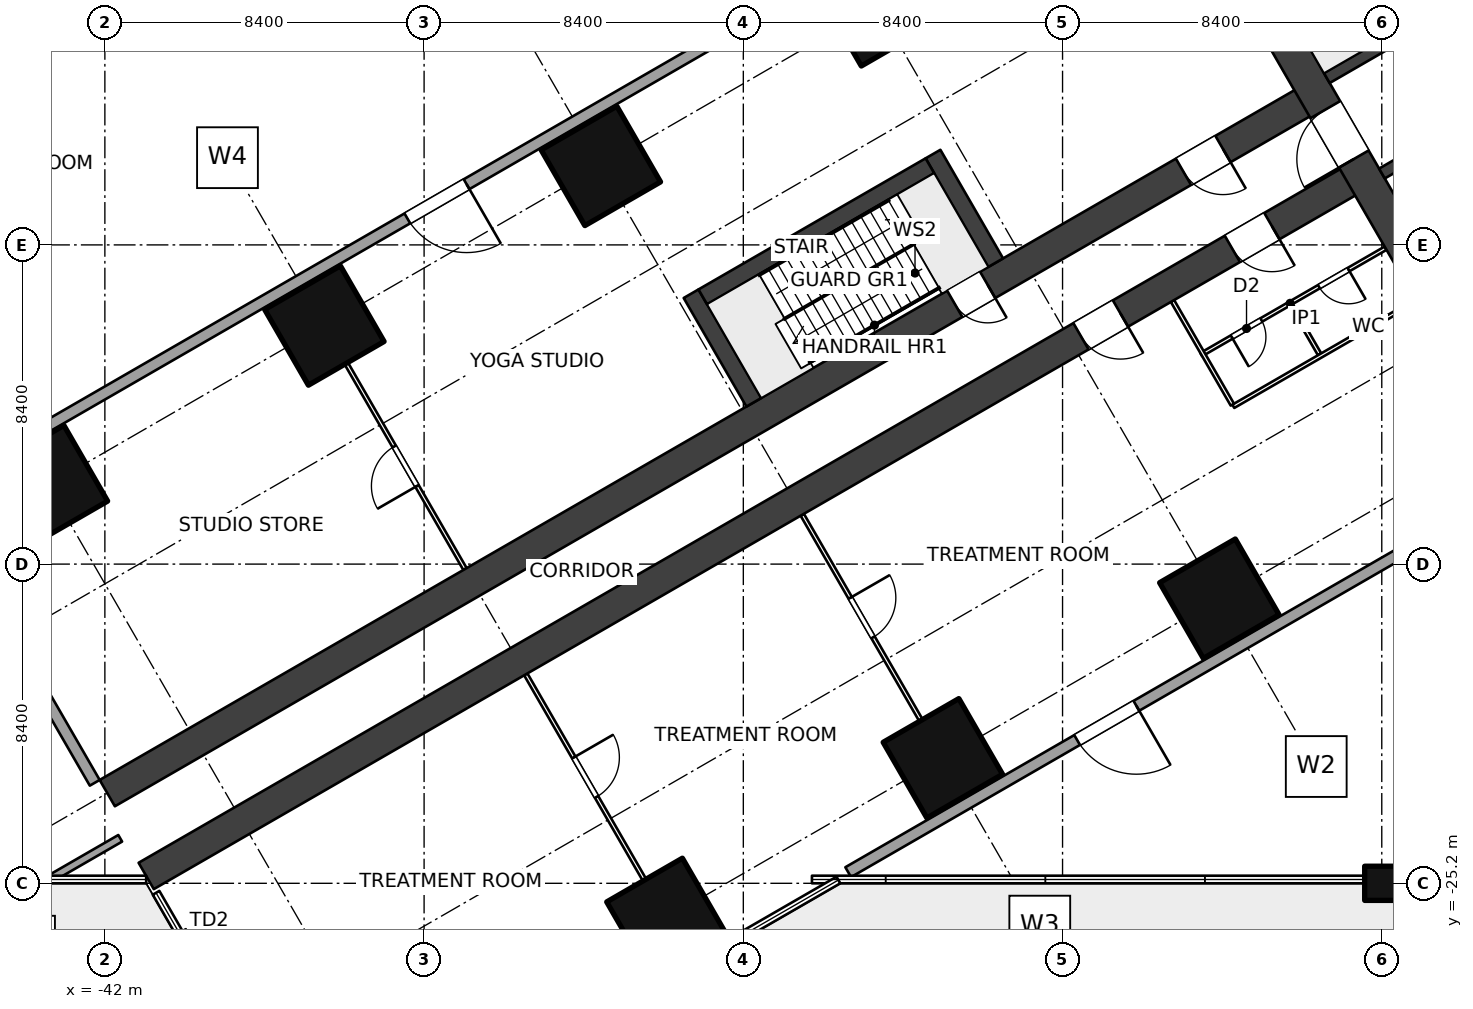
"""IFC4 building model, lengths in metres.
Left out: names, types, materials, properties, quantities, classifications, styles, units other than length and angle.
Written with IfcOpenShell. Run it as: python <this file> out.ifc"""

import sys

from ifc_helpers import new_model, si_unit, direction, frame, frame_2d, origin, origin_2d, place, context, subcontext, project, spatial, rectangle, extrude, element, fill, save


model = new_model("IFC4")
c1 = context("Model", 3, precision=1e-05, world=origin(), true_north=direction((0.0, 1.0)))
c2 = subcontext(c1, "Body", "Model", "MODEL_VIEW")
j1 = project(units=[si_unit("LENGTHUNIT", "METRE"), si_unit("PLANEANGLEUNIT", "RADIAN")], contexts=[c1])
p1 = place(None, origin())
s1 = spatial("IfcSite", under=j1, at=p1, CompositionType="ELEMENT")
p2 = place(p1, origin())
s2 = spatial("IfcBuilding", under=s1, at=p2, CompositionType="ELEMENT")
p3 = place(p2, frame((0.0, 0.0, 11.0)))
s3 = spatial("IfcBuildingStorey", under=s2, at=p3, CompositionType="ELEMENT", Elevation=11.0)
for number, where, z_axis, x_axis in (
    (1, (-12.675, -17.71, 0.0), (0.0, 0.0, 1.0), (-0.5, 0.866, 0.0)),
    (2, (-21.675, -2.122, 0.0), (0.0, 0.0, 1.0), (-0.5, 0.866, 0.0)),
    (3, (-19.949, -21.91, 0.0), (0.0, 0.0, 1.0), (-0.5, 0.866, 0.0)),
    (4, (-28.949, -6.322, 0.0), (0.0, 0.0, 1.0), (-0.5, 0.866, 0.0)),
    (5, (-27.224, -26.11, 0.0), (0.0, 0.0, 1.0), (-0.5, 0.866, 0.0)),
    (6, (-36.224, -10.521, 0.0), (0.0, 0.0, 1.0), (-0.5, 0.866, 0.0)),
    (7, (-43.499, -14.721, 0.0), (0.0, 0.0, 1.0), (-0.5, 0.866, 0.0)),
):
    element("IfcColumn", number, at=place(p3, frame(where, z_axis=z_axis, x_axis=x_axis)), inside=s3, PredefinedType="COLUMN", context=c2, shape_type="SweptSolid", body=[
        extrude(rectangle(XDim=2.3, YDim=2.3, at=origin_2d()), origin(), (0.0, 0.0, 1.0), 5.0),
    ])
p4 = place(p3, frame((-8.4, -25.2, 0.0), z_axis=(0.0, 0.0, 1.0), x_axis=(1.0, 0.0, 0.0)))
e8 = element("IfcColumn", 8, at=p4, inside=s3, PredefinedType="COLUMN", context=c2, shape_type="SweptSolid", body=[
    extrude(rectangle(XDim=0.9, YDim=0.9, at=origin_2d()), origin(), (0.0, 0.0, 1.0), 5.0),
])
p5 = place(p3, frame((-6.47, -10.757, 0.0), z_axis=(0.0, 0.0, 1.0), x_axis=(-0.499997612506, 0.8660267822, 0.0)))
e9 = element("IfcWall", 9, at=p5, inside=s3, PredefinedType="SHEAR", context=c2, shape_type="SweptSolid", body=[
    extrude(rectangle(XDim=12.161, YDim=0.9, at=frame_2d((6.08, 0.0))), origin(), (0.0, 0.0, 1.0), 5.0),
])
p6 = place(p5, frame((5.33, 0.0, 0.0)))
e10 = element("IfcOpeningElement", 10, at=p6, cuts=e9, PredefinedType="OPENING", context=c2, shape_type="SweptSolid", body=[
    extrude(rectangle(XDim=1.5, YDim=2.1, at=frame_2d((0.75, 1.05))), frame((0.0, 0.46, 0.0), z_axis=(0.0, -1.0, 0.0), x_axis=(1.0, 0.0, 0.0)), (0.0, 0.0, 1.0), 0.92),
])
p7 = place(p3, frame((-3.869, -0.559, 0.0), z_axis=(0.0, 0.0, 1.0), x_axis=(-0.86602711848, -0.499997030048, 0.0)))
e11 = element("IfcWall", 11, at=p7, inside=s3, PredefinedType="SHEAR", context=c2, shape_type="SweptSolid", body=[
    extrude(rectangle(XDim=6.901, YDim=0.3, at=frame_2d((3.451, 0.0))), origin(), (0.0, 0.0, 1.0), 5.0),
])
p8 = place(p7, frame((0.25, 0.0, 0.0)))
e12 = element("IfcOpeningElement", 12, at=p8, cuts=e11, PredefinedType="OPENING", context=c2, shape_type="SweptSolid", body=[
    extrude(rectangle(XDim=1.0, YDim=2.1, at=frame_2d((0.5, 1.05))), frame((0.0, 0.16, 0.0), z_axis=(0.0, -1.0, 0.0), x_axis=(1.0, 0.0, 0.0)), (0.0, 0.0, 1.0), 0.32),
])
p9 = place(p3, frame((-2.419, -3.071, 0.0), z_axis=(0.0, 0.0, 1.0), x_axis=(-0.86602711848, -0.499997030048, 0.0)))
e13 = element("IfcWall", 13, at=p9, inside=s3, PredefinedType="SHEAR", context=c2, shape_type="SweptSolid", body=[
    extrude(rectangle(XDim=6.901, YDim=0.3, at=frame_2d((3.451, 0.0))), origin(), (0.0, 0.0, 1.0), 5.0),
])
p10 = place(p9, frame((4.85, 0.0, 0.0)))
e14 = element("IfcOpeningElement", 14, at=p10, cuts=e13, PredefinedType="OPENING", context=c2, shape_type="SweptSolid", body=[
    extrude(rectangle(XDim=1.1, YDim=2.1, at=frame_2d((0.55, 1.05))), frame((0.0, 0.16, 0.0), z_axis=(0.0, -1.0, 0.0), x_axis=(1.0, 0.0, 0.0)), (0.0, 0.0, 1.0), 0.32),
])
p11 = place(p3, frame((-8.91, -6.53, 0.0), z_axis=(0.0, 0.0, 1.0), x_axis=(-0.866024404313, -0.500001731131, 0.0)))
e15 = element("IfcWall", 15, at=p11, inside=s3, PredefinedType="SHEAR", context=c2, shape_type="SweptSolid", body=[
    extrude(rectangle(XDim=36.953, YDim=0.8, at=frame_2d((18.477, 0.0))), origin(), (0.0, 0.0, 1.0), 5.0),
])
p12 = place(p11, frame((2.75, 0.0, 0.0)))
e16 = element("IfcOpeningElement", 16, at=p12, cuts=e15, PredefinedType="OPENING", context=c2, shape_type="SweptSolid", body=[
    extrude(rectangle(XDim=1.2, YDim=2.1, at=frame_2d((0.6, 1.05))), frame((0.0, 0.41, 0.0), z_axis=(0.0, -1.0, 0.0), x_axis=(1.0, 0.0, 0.0)), (0.0, 0.0, 1.0), 0.82),
])
p13 = place(p11, frame((7.35, 0.0, 0.0)))
e17 = element("IfcOpeningElement", 17, at=p13, cuts=e15, PredefinedType="OPENING", context=c2, shape_type="SweptSolid", body=[
    extrude(rectangle(XDim=1.2, YDim=2.1, at=frame_2d((0.6, 1.05))), frame((0.0, 0.41, 0.0), z_axis=(0.0, -1.0, 0.0), x_axis=(1.0, 0.0, 0.0)), (0.0, 0.0, 1.0), 0.82),
])
p14 = place(p3, frame((-10.11, -4.451, 0.0), z_axis=(0.0, 0.0, 1.0), x_axis=(-0.866025284237, -0.500000207062, 0.0)))
e18 = element("IfcWall", 18, at=p14, inside=s3, PredefinedType="SHEAR", context=c2, shape_type="SweptSolid", body=[
    extrude(rectangle(XDim=36.75, YDim=0.8, at=frame_2d((18.375, 0.0))), origin(), (0.0, 0.0, 1.0), 5.0),
])
p15 = place(p14, frame((10.0, 0.0, 0.0)))
e19 = element("IfcOpeningElement", 19, at=p15, cuts=e18, PredefinedType="OPENING", context=c2, shape_type="SweptSolid", body=[
    extrude(rectangle(XDim=1.0, YDim=2.1, at=frame_2d((0.5, 1.05))), frame((0.0, 0.41, 0.0), z_axis=(0.0, -1.0, 0.0), x_axis=(1.0, 0.0, 0.0)), (0.0, 0.0, 1.0), 0.82),
])
p16 = place(p14, frame((2.85, 0.0, 0.0)))
e20 = element("IfcOpeningElement", 20, at=p16, cuts=e18, PredefinedType="OPENING", context=c2, shape_type="SweptSolid", body=[
    extrude(rectangle(XDim=1.2, YDim=2.1, at=frame_2d((0.6, 1.05))), frame((0.0, 0.41, 0.0), z_axis=(0.0, -1.0, 0.0), x_axis=(1.0, 0.0, 0.0)), (0.0, 0.0, 1.0), 0.82),
])
p17 = place(p3, frame((-8.3, -8.487, 0.0), z_axis=(0.0, 0.0, 1.0), x_axis=(-0.866015695474, -0.500016814911, 0.0)))
e21 = element("IfcWall", 21, at=p17, inside=s3, PredefinedType="PARTITIONING", context=c2, shape_type="SweptSolid", body=[
    extrude(rectangle(XDim=5.6, YDim=0.1, at=frame_2d((2.8, 0.0))), origin(), (0.0, 0.0, 1.0), 4.7),
])
p18 = place(p17, frame((1.125, 0.0, 0.0)))
e22 = element("IfcOpeningElement", 22, at=p18, cuts=e21, PredefinedType="OPENING", context=c2, shape_type="SweptSolid", body=[
    extrude(rectangle(XDim=0.9, YDim=2.1, at=frame_2d((0.45, 1.05))), frame((0.0, 0.06, 0.0), z_axis=(0.0, -1.0, 0.0), x_axis=(1.0, 0.0, 0.0)), (0.0, 0.0, 1.0), 0.12),
])
p19 = place(p17, frame((3.775, 0.0, 0.0)))
e23 = element("IfcOpeningElement", 23, at=p19, cuts=e21, PredefinedType="OPENING", context=c2, shape_type="SweptSolid", body=[
    extrude(rectangle(XDim=0.9, YDim=2.1, at=frame_2d((0.45, 1.05))), frame((0.0, 0.06, 0.0), z_axis=(0.0, -1.0, 0.0), x_axis=(1.0, 0.0, 0.0)), (0.0, 0.0, 1.0), 0.12),
])
p20 = place(p3, frame((-10.786, -9.98, 0.0), z_axis=(0.0, 0.0, 1.0), x_axis=(0.500060622324, -0.86599040064, 0.0)))
e24 = element("IfcWall", 24, at=p20, inside=s3, PredefinedType="PARTITIONING", context=c2, shape_type="SweptSolid", body=[
    extrude(rectangle(XDim=1.5, YDim=0.1, at=frame_2d((0.75, 0.0))), origin(), (0.0, 0.0, 1.0), 4.7),
])
p21 = place(p3, frame((-7.5, -9.873, 0.0), z_axis=(0.0, 0.0, 1.0), x_axis=(-0.866031018186, -0.499990275446, 0.0)))
e25 = element("IfcWall", 25, at=p21, inside=s3, PredefinedType="PARTITIONING", context=c2, shape_type="SweptSolid", body=[
    extrude(rectangle(XDim=5.55, YDim=0.1, at=frame_2d((2.775, 0.0))), origin(), (0.0, 0.0, 1.0), 4.7),
])
p22 = place(p3, frame((-13.906, -9.876, 0.0), z_axis=(0.0, 0.0, 1.0), x_axis=(0.499981869177, -0.866035871367, 0.0)))
e26 = element("IfcWall", 26, at=p22, inside=s3, PredefinedType="PARTITIONING", context=c2, shape_type="SweptSolid", body=[
    extrude(rectangle(XDim=3.15, YDim=0.1, at=frame_2d((1.575, 0.0))), origin(), (0.0, 0.0, 1.0), 4.7),
])
p23 = place(p3, frame((-23.649, -15.501, 0.0), z_axis=(0.0, 0.0, 1.0), x_axis=(0.500004234368, -0.866022959057, 0.0)))
e27 = element("IfcWall", 27, at=p23, inside=s3, PredefinedType="PARTITIONING", context=c2, shape_type="SweptSolid", body=[
    extrude(rectangle(XDim=6.25, YDim=0.1, at=frame_2d((3.125, 0.0))), origin(), (0.0, 0.0, 1.0), 2.9),
])
p24 = place(p23, frame((2.525, 0.0, 0.0)))
e28 = element("IfcOpeningElement", 28, at=p24, cuts=e27, PredefinedType="OPENING", context=c2, shape_type="SweptSolid", body=[
    extrude(rectangle(XDim=1.2, YDim=2.1, at=frame_2d((0.6, 1.05))), frame((0.0, 0.06, 0.0), z_axis=(0.0, -1.0, 0.0), x_axis=(1.0, 0.0, 0.0)), (0.0, 0.0, 1.0), 0.12),
])
p25 = place(p3, frame((-30.924, -19.701, 0.0), z_axis=(0.0, 0.0, 1.0), x_axis=(0.500004234368, -0.866022959057, 0.0)))
e29 = element("IfcWall", 29, at=p25, inside=s3, PredefinedType="PARTITIONING", context=c2, shape_type="SweptSolid", body=[
    extrude(rectangle(XDim=6.25, YDim=0.1, at=frame_2d((3.125, 0.0))), origin(), (0.0, 0.0, 1.0), 2.9),
])
p26 = place(p25, frame((2.525, 0.0, 0.0)))
e30 = element("IfcOpeningElement", 30, at=p26, cuts=e29, PredefinedType="OPENING", context=c2, shape_type="SweptSolid", body=[
    extrude(rectangle(XDim=1.2, YDim=2.1, at=frame_2d((0.6, 1.05))), frame((0.0, 0.06, 0.0), z_axis=(0.0, -1.0, 0.0), x_axis=(1.0, 0.0, 0.0)), (0.0, 0.0, 1.0), 0.12),
])
p27 = place(p3, frame((-32.524, -16.93, 0.0), z_axis=(0.0, 0.0, 1.0), x_axis=(-0.500004234368, 0.866022959057, 0.0)))
e31 = element("IfcWall", 31, at=p27, inside=s3, PredefinedType="PARTITIONING", context=c2, shape_type="SweptSolid", body=[
    extrude(rectangle(XDim=6.25, YDim=0.1, at=frame_2d((3.125, 0.0))), origin(), (0.0, 0.0, 1.0), 2.9),
])
p28 = place(p27, frame((2.525, 0.0, 0.0)))
e32 = element("IfcOpeningElement", 32, at=p28, cuts=e31, PredefinedType="OPENING", context=c2, shape_type="SweptSolid", body=[
    extrude(rectangle(XDim=1.2, YDim=2.1, at=frame_2d((0.6, 1.05))), frame((0.0, 0.06, 0.0), z_axis=(0.0, -1.0, 0.0), x_axis=(1.0, 0.0, 0.0)), (0.0, 0.0, 1.0), 0.12),
])
p29 = place(p3, frame((-41.596, -24.016, 0.0), z_axis=(0.0, 0.0, 1.0), x_axis=(-0.866065436262, -0.499930655304, 0.0)))
e33 = element("IfcWall", 33, at=p29, inside=s3, PredefinedType="SOLIDWALL", context=c2, shape_type="SweptSolid", body=[
    extrude(rectangle(XDim=2.368, YDim=0.2, at=frame_2d((1.184, 0.0))), origin(), (0.0, 0.0, 1.0), 4.7),
])
p30 = place(p3, frame((-42.267, -22.555, 0.0), z_axis=(0.0, 0.0, 1.0), x_axis=(-0.500007509209, 0.866021068297, 0.0)))
e34 = element("IfcWall", 34, at=p30, inside=s3, PredefinedType="SOLIDWALL", context=c2, shape_type="SweptSolid", body=[
    extrude(rectangle(XDim=8.6, YDim=0.3, at=frame_2d((4.3, 0.0))), origin(), (0.0, 0.0, 1.0), 3.1),
])
p31 = place(p3, frame((-0.15, -12.038, 0.0), z_axis=(0.0, 0.0, 1.0), x_axis=(-0.866030473254, -0.499991219318, 0.0)))
e35 = element("IfcWall", 35, at=p31, inside=s3, PredefinedType="SOLIDWALL", context=c2, shape_type="SweptSolid", body=[
    extrude(rectangle(XDim=25.739, YDim=0.3, at=frame_2d((12.869, 0.0))), origin(), (0.0, 0.0, 1.0), 4.7),
])
p32 = place(p31, frame((16.983, 0.0, 0.0)))
e36 = element("IfcOpeningElement", 36, at=p32, cuts=e35, PredefinedType="OPENING", context=c2, shape_type="SweptSolid", body=[
    extrude(rectangle(XDim=1.8, YDim=2.4, at=frame_2d((0.9, 1.2))), frame((0.0, 0.16, 0.0), z_axis=(0.0, -1.0, 0.0), x_axis=(1.0, 0.0, 0.0)), (0.0, 0.0, 1.0), 0.32),
])
p33 = place(p3, frame((-9.45, 6.495, 0.0), z_axis=(0.0, 0.0, 1.0), x_axis=(-0.866025301493, -0.500000177174, 0.0)))
e37 = element("IfcWall", 37, at=p33, inside=s3, PredefinedType="SOLIDWALL", context=c2, shape_type="SweptSolid", body=[
    extrude(rectangle(XDim=43.095, YDim=0.3, at=frame_2d((21.548, 0.0))), origin(), (0.0, 0.0, 1.0), 4.7),
])
p34 = place(p33, frame((26.595, 0.0, 0.0)))
e38 = element("IfcOpeningElement", 38, at=p34, cuts=e37, PredefinedType="OPENING", context=c2, shape_type="SweptSolid", body=[
    extrude(rectangle(XDim=1.8, YDim=2.4, at=frame_2d((0.9, 1.2))), frame((0.0, 0.16, 0.0), z_axis=(0.0, -1.0, 0.0), x_axis=(1.0, 0.0, 0.0)), (0.0, 0.0, 1.0), 0.32),
])
for number, where, z_axis, x_axis in (
    (39, (-18.559, -8.868, 0.0), (0.0, 0.0, 1.0), (-0.5, 0.866, 0.0)),
    (40, (-24.925, -12.543, 0.0), (0.0, 0.0, 1.0), (-0.5, 0.866, 0.0)),
):
    element("IfcWall", number, at=place(p3, frame(where, z_axis=z_axis, x_axis=x_axis)), inside=s3, PredefinedType="SOLIDWALL", context=c2, shape_type="SweptSolid", body=[
        extrude(rectangle(XDim=3.3, YDim=0.45, at=frame_2d((1.65, 0.0))), origin(), (0.0, 0.0, 1.0), 5.0),
    ])
p35 = place(p3, frame((-20.292, -6.317, 0.0), z_axis=(0.0, 0.0, 1.0), x_axis=(-0.866028853923, -0.499994024137, 0.0)))
e41 = element("IfcWall", 41, at=p35, inside=s3, PredefinedType="SOLIDWALL", context=c2, shape_type="SweptSolid", body=[
    extrude(rectangle(XDim=6.9, YDim=0.45, at=frame_2d((3.45, 0.0))), origin(), (0.0, 0.0, 1.0), 5.0),
])
p36 = place(p6, origin())
e42 = element("IfcDoor", 42, at=p36, inside=s3, OperationType="DOUBLE_DOOR_DOUBLE_SWING", PredefinedType="DOOR", context=c2, shape_type="SweptSolid", body=[
    extrude(rectangle(XDim=1.5, YDim=2.1, at=frame_2d((0.75, 1.05))), frame((0.0, 0.025, 0.0), z_axis=(0.0, -1.0, 0.0), x_axis=(1.0, 0.0, 0.0)), (0.0, 0.0, 1.0), 0.05),
])
fill(e10, e42)
p37 = place(p15, origin())
e43 = element("IfcDoor", 43, at=p37, inside=s3, OperationType="SINGLE_SWING_LEFT", PredefinedType="DOOR", context=c2, shape_type="SweptSolid", body=[
    extrude(rectangle(XDim=1.0, YDim=2.1, at=frame_2d((0.5, 1.05))), frame((0.0, 0.025, 0.0), z_axis=(0.0, -1.0, 0.0), x_axis=(1.0, 0.0, 0.0)), (0.0, 0.0, 1.0), 0.05),
])
fill(e19, e43)
p38 = place(p18, origin())
e44 = element("IfcDoor", 44, at=p38, inside=s3, OperationType="SINGLE_SWING_LEFT", PredefinedType="DOOR", context=c2, shape_type="SweptSolid", body=[
    extrude(rectangle(XDim=0.9, YDim=2.1, at=frame_2d((0.45, 1.05))), frame((0.0, 0.025, 0.0), z_axis=(0.0, -1.0, 0.0), x_axis=(1.0, 0.0, 0.0)), (0.0, 0.0, 1.0), 0.05),
])
fill(e22, e44)
p39 = place(p19, origin())
e45 = element("IfcDoor", 45, at=p39, inside=s3, OperationType="SINGLE_SWING_RIGHT", PredefinedType="DOOR", context=c2, shape_type="SweptSolid", body=[
    extrude(rectangle(XDim=0.9, YDim=2.1, at=frame_2d((0.45, 1.05))), frame((0.0, 0.025, 0.0), z_axis=(0.0, -1.0, 0.0), x_axis=(1.0, 0.0, 0.0)), (0.0, 0.0, 1.0), 0.05),
])
fill(e23, e45)
p40 = place(p12, origin())
e46 = element("IfcDoor", 46, at=p40, inside=s3, OperationType="DOUBLE_SWING_LEFT", PredefinedType="DOOR", context=c2, shape_type="SweptSolid", body=[
    extrude(rectangle(XDim=1.2, YDim=2.1, at=frame_2d((0.6, 1.05))), frame((0.0, 0.025, 0.0), z_axis=(0.0, -1.0, 0.0), x_axis=(1.0, 0.0, 0.0)), (0.0, 0.0, 1.0), 0.05),
])
fill(e16, e46)
p41 = place(p24, origin())
e47 = element("IfcDoor", 47, at=p41, inside=s3, OperationType="DOUBLE_SWING_LEFT", PredefinedType="DOOR", context=c2, shape_type="SweptSolid", body=[
    extrude(rectangle(XDim=1.2, YDim=2.1, at=frame_2d((0.6, 1.05))), frame((0.0, 0.025, 0.0), z_axis=(0.0, -1.0, 0.0), x_axis=(1.0, 0.0, 0.0)), (0.0, 0.0, 1.0), 0.05),
])
fill(e28, e47)
p42 = place(p26, origin())
e48 = element("IfcDoor", 48, at=p42, inside=s3, OperationType="DOUBLE_SWING_LEFT", PredefinedType="DOOR", context=c2, shape_type="SweptSolid", body=[
    extrude(rectangle(XDim=1.2, YDim=2.1, at=frame_2d((0.6, 1.05))), frame((0.0, 0.025, 0.0), z_axis=(0.0, -1.0, 0.0), x_axis=(1.0, 0.0, 0.0)), (0.0, 0.0, 1.0), 0.05),
])
fill(e30, e48)
p43 = place(p13, origin())
e49 = element("IfcDoor", 49, at=p43, inside=s3, OperationType="DOUBLE_SWING_LEFT", PredefinedType="DOOR", context=c2, shape_type="SweptSolid", body=[
    extrude(rectangle(XDim=1.2, YDim=2.1, at=frame_2d((0.6, 1.05))), frame((0.0, 0.025, 0.0), z_axis=(0.0, -1.0, 0.0), x_axis=(1.0, 0.0, 0.0)), (0.0, 0.0, 1.0), 0.05),
])
fill(e17, e49)
p44 = place(p28, origin())
e50 = element("IfcDoor", 50, at=p44, inside=s3, OperationType="DOUBLE_SWING_LEFT", PredefinedType="DOOR", context=c2, shape_type="SweptSolid", body=[
    extrude(rectangle(XDim=1.2, YDim=2.1, at=frame_2d((0.6, 1.05))), frame((0.0, 0.025, 0.0), z_axis=(0.0, -1.0, 0.0), x_axis=(1.0, 0.0, 0.0)), (0.0, 0.0, 1.0), 0.05),
])
fill(e32, e50)
p45 = place(p16, origin())
e51 = element("IfcDoor", 51, at=p45, inside=s3, OperationType="DOUBLE_SWING_LEFT", PredefinedType="DOOR", context=c2, shape_type="SweptSolid", body=[
    extrude(rectangle(XDim=1.2, YDim=2.1, at=frame_2d((0.6, 1.05))), frame((0.0, 0.025, 0.0), z_axis=(0.0, -1.0, 0.0), x_axis=(1.0, 0.0, 0.0)), (0.0, 0.0, 1.0), 0.05),
])
fill(e20, e51)
p46 = place(p32, origin())
e52 = element("IfcDoor", 52, at=p46, inside=s3, OperationType="DOUBLE_DOOR_DOUBLE_SWING", PredefinedType="DOOR", context=c2, shape_type="SweptSolid", body=[
    extrude(rectangle(XDim=1.8, YDim=2.4, at=frame_2d((0.9, 1.2))), frame((0.0, 0.025, 0.0), z_axis=(0.0, -1.0, 0.0), x_axis=(1.0, 0.0, 0.0)), (0.0, 0.0, 1.0), 0.05),
])
fill(e36, e52)
p47 = place(p34, origin())
e53 = element("IfcDoor", 53, at=p47, inside=s3, OperationType="DOUBLE_DOOR_DOUBLE_SWING", PredefinedType="DOOR", context=c2, shape_type="SweptSolid", body=[
    extrude(rectangle(XDim=1.8, YDim=2.4, at=frame_2d((0.9, 1.2))), frame((0.0, 0.025, 0.0), z_axis=(0.0, -1.0, 0.0), x_axis=(1.0, 0.0, 0.0)), (0.0, 0.0, 1.0), 0.05),
])
fill(e38, e53)
save(model, sys.argv[1])
